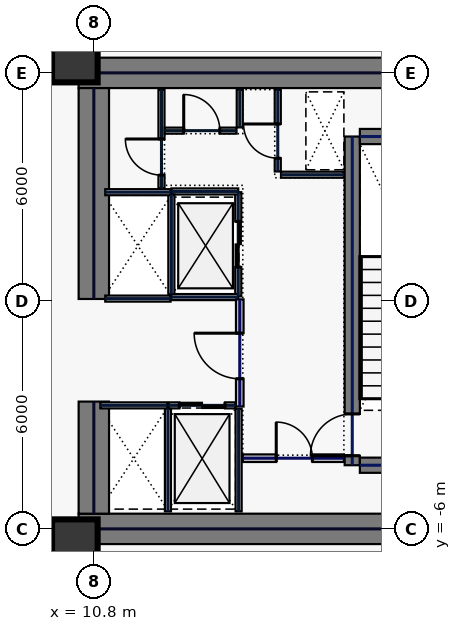
"""IFC4 building model, lengths in metres.
Left out: names, types, materials, properties, quantities, classifications, styles, units other than length and angle.
Written with IfcOpenShell. Run it as: python <this file> out.ifc"""

import sys

from ifc_helpers import new_model, si_unit, direction, frame, frame_2d, origin, origin_2d, place, context, subcontext, project, spatial, rectangle, hollow_rectangle, extrude, element, fill, save


model = new_model("IFC4")
c1 = context("Model", 3, precision=1e-05, world=origin(), true_north=direction((0.0, 1.0)))
c2 = subcontext(c1, "Body", "Model", "MODEL_VIEW")
j1 = project(units=[si_unit("LENGTHUNIT", "METRE"), si_unit("PLANEANGLEUNIT", "RADIAN")], contexts=[c1])
p1 = place(None, origin())
s1 = spatial("IfcSite", under=j1, at=p1, CompositionType="ELEMENT")
p2 = place(p1, origin())
s2 = spatial("IfcBuilding", under=s1, at=p2, CompositionType="ELEMENT")
p3 = place(p2, frame((0.0, 0.0, 47.4)))
s3 = spatial("IfcBuildingStorey", under=s2, at=p3, CompositionType="ELEMENT", Elevation=47.4)
for number, where, z_axis, x_axis in (
    (1, (10.4, 6.0, 0.0), (0.0, 0.0, 1.0), (1.0, 0.0, 0.0)),
    (2, (10.4, -6.0, 0.0), (0.0, 0.0, 1.0), (1.0, 0.0, 0.0)),
):
    element("IfcWall", number, at=place(p3, frame(where, z_axis=z_axis, x_axis=x_axis)), inside=s3, PredefinedType="SHEAR", context=c2, shape_type="SweptSolid", body=[
        extrude(rectangle(XDim=11.6, YDim=0.8, at=frame_2d((5.8, 0.0))), origin(), (0.0, 0.0, 1.0), 3.74),
    ])
p4 = place(p3, frame((10.8, -5.6, 0.0), z_axis=(0.0, 0.0, 1.0), x_axis=(0.0, 1.0, 0.0)))
e3 = element("IfcWall", 3, at=p4, inside=s3, PredefinedType="SHEAR", context=c2, shape_type="SweptSolid", body=[
    extrude(rectangle(XDim=2.95, YDim=0.8, at=frame_2d((1.475, 0.0))), origin(), (0.0, 0.0, 1.0), 3.74),
])
p5 = place(p3, frame((10.8, 0.05, 0.0), z_axis=(0.0, 0.0, 1.0), x_axis=(0.0, 1.0, 0.0)))
e4 = element("IfcWall", 4, at=p5, inside=s3, PredefinedType="SHEAR", context=c2, shape_type="SweptSolid", body=[
    extrude(rectangle(XDim=5.55, YDim=0.8, at=frame_2d((2.775, 0.0))), origin(), (0.0, 0.0, 1.0), 3.74),
])
p6 = place(p3, frame((17.6, -4.325, 0.0), z_axis=(0.0, 0.0, 1.0), x_axis=(0.0, 1.0, 0.0)))
e5 = element("IfcWall", 5, at=p6, inside=s3, PredefinedType="SHEAR", context=c2, shape_type="SweptSolid", body=[
    extrude(rectangle(XDim=8.65, YDim=0.4, at=frame_2d((4.325, 0.0))), origin(), (0.0, 0.0, 1.0), 3.74),
])
p7 = place(p6, frame((0.25, 0.0, 0.0)))
e6 = element("IfcOpeningElement", 6, at=p7, cuts=e5, PredefinedType="OPENING", context=c2, shape_type="SweptSolid", body=[
    extrude(rectangle(XDim=1.1, YDim=2.2, at=frame_2d((0.55, 1.1))), frame((0.0, 0.21, 0.0), z_axis=(0.0, -1.0, 0.0), x_axis=(1.0, 0.0, 0.0)), (0.0, 0.0, 1.0), 0.42),
])
for number, where, z_axis, x_axis in (
    (7, (17.8, -4.325, 0.0), (0.0, 0.0, 1.0), (1.0, 0.0, 0.0)),
    (8, (17.8, 4.325, 0.0), (0.0, 0.0, 1.0), (1.0, 0.0, 0.0)),
):
    element("IfcWall", number, at=place(p3, frame(where, z_axis=z_axis, x_axis=x_axis)), inside=s3, PredefinedType="SHEAR", context=c2, shape_type="SweptSolid", body=[
        extrude(rectangle(XDim=3.4, YDim=0.4, at=frame_2d((1.7, 0.0))), origin(), (0.0, 0.0, 1.0), 3.74),
    ])
for number, where, z_axis, x_axis in (
    (9, (10.3, -6.35, 0.0), (0.0, 0.0, 1.0), (1.0, 0.0, 0.0)),
    (10, (10.3, 6.35, 0.0), (0.0, 0.0, 1.0), (1.0, 0.0, 0.0)),
):
    element("IfcColumn", number, at=place(p3, frame(where, z_axis=z_axis, x_axis=x_axis)), inside=s3, PredefinedType="COLUMN", context=c2, shape_type="SweptSolid", body=[
        extrude(hollow_rectangle(XDim=1.2, YDim=1.2, WallThickness=0.05, at=origin_2d()), origin(), (0.0, 0.0, 1.0), 3.74),
    ])
p8 = place(p3, frame((14.6, 0.12, 0.0), z_axis=(0.0, 0.0, 1.0), x_axis=(0.0, 1.0, 0.0)))
e11 = element("IfcWall", 11, at=p8, inside=s3, PredefinedType="PARTITIONING", context=c2, shape_type="SweptSolid", body=[
    extrude(rectangle(XDim=2.74, YDim=0.16, at=frame_2d((1.37, 0.0))), origin(), (0.0, 0.0, 1.0), 3.74),
])
p9 = place(p8, frame((0.77, 0.0, 0.0)))
e12 = element("IfcOpeningElement", 12, at=p9, cuts=e11, PredefinedType="OPENING", context=c2, shape_type="SweptSolid", body=[
    extrude(rectangle(XDim=1.2, YDim=2.2, at=frame_2d((0.6, 1.1))), frame((0.0, 0.09, 0.0), z_axis=(0.0, -1.0, 0.0), x_axis=(1.0, 0.0, 0.0)), (0.0, 0.0, 1.0), 0.18),
])
for number, where, z_axis, x_axis in (
    (13, (12.84, 0.1, 0.0), (0.0, 0.0, 1.0), (1.0, 0.0, 0.0)),
    (14, (12.84, 2.88, 0.0), (0.0, 0.0, 1.0), (1.0, 0.0, 0.0)),
):
    element("IfcWall", number, at=place(p3, frame(where, z_axis=z_axis, x_axis=x_axis)), inside=s3, PredefinedType="PARTITIONING", context=c2, shape_type="SweptSolid", body=[
        extrude(rectangle(XDim=1.76, YDim=0.16, at=frame_2d((0.88, 0.0))), origin(), (0.0, 0.0, 1.0), 3.74),
    ])
p10 = place(p3, frame((12.84, 0.18, 0.0), z_axis=(0.0, 0.0, 1.0), x_axis=(0.0, 1.0, 0.0)))
e15 = element("IfcWall", 15, at=p10, inside=s3, PredefinedType="PARTITIONING", context=c2, shape_type="SweptSolid", body=[
    extrude(rectangle(XDim=2.62, YDim=0.16, at=frame_2d((1.31, 0.0))), origin(), (0.0, 0.0, 1.0), 3.74),
])
p11 = place(p3, frame((12.77, -2.75, 0.0), z_axis=(0.0, 0.0, 1.0), x_axis=(1.0, 0.0, 0.0)))
e16 = element("IfcWall", 16, at=p11, inside=s3, PredefinedType="PARTITIONING", context=c2, shape_type="SweptSolid", body=[
    extrude(rectangle(XDim=1.76, YDim=0.16, at=frame_2d((0.88, 0.0))), origin(), (0.0, 0.0, 1.0), 3.74),
])
p12 = place(p11, frame((0.28, 0.0, 0.0)))
e17 = element("IfcOpeningElement", 17, at=p12, cuts=e16, PredefinedType="OPENING", context=c2, shape_type="SweptSolid", body=[
    extrude(rectangle(XDim=1.2, YDim=2.2, at=frame_2d((0.6, 1.1))), frame((0.0, 0.09, 0.0), z_axis=(0.0, -1.0, 0.0), x_axis=(1.0, 0.0, 0.0)), (0.0, 0.0, 1.0), 0.18),
])
for number, where, z_axis, x_axis in (
    (18, (12.75, -5.54, 0.0), (0.0, 0.0, 1.0), (0.0, 1.0, 0.0)),
    (19, (14.61, -5.54, 0.0), (0.0, 0.0, 1.0), (0.0, 1.0, 0.0)),
):
    element("IfcWall", number, at=place(p3, frame(where, z_axis=z_axis, x_axis=x_axis)), inside=s3, PredefinedType="PARTITIONING", context=c2, shape_type="SweptSolid", body=[
        extrude(rectangle(XDim=2.7, YDim=0.16, at=frame_2d((1.35, 0.0))), origin(), (0.0, 0.0, 1.0), 3.74),
    ])
p13 = place(p3, frame((10.97, -2.75, 0.0), z_axis=(0.0, 0.0, 1.0), x_axis=(1.0, 0.0, 0.0)))
e20 = element("IfcWall", 20, at=p13, inside=s3, PredefinedType="PARTITIONING", context=c2, shape_type="SweptSolid", body=[
    extrude(rectangle(XDim=1.76, YDim=0.16, at=frame_2d((0.88, 0.0))), origin(), (0.0, 0.0, 1.0), 3.74),
])
for number, where, z_axis, x_axis in (
    (21, (11.1, 0.06, 0.0), (0.0, 0.0, 1.0), (1.0, 0.0, 0.0)),
    (22, (11.1, 2.86, 0.0), (0.0, 0.0, 1.0), (1.0, 0.0, 0.0)),
):
    element("IfcWall", number, at=place(p3, frame(where, z_axis=z_axis, x_axis=x_axis)), inside=s3, PredefinedType="PARTITIONING", context=c2, shape_type="SweptSolid", body=[
        extrude(rectangle(XDim=1.72, YDim=0.16, at=frame_2d((0.86, 0.0))), origin(), (0.0, 0.0, 1.0), 3.74),
    ])
p14 = place(p3, frame((15.64, 3.405, 0.0), z_axis=(0.0, 0.0, 1.0), x_axis=(0.0, 1.0, 0.0)))
e23 = element("IfcWall", 23, at=p14, inside=s3, PredefinedType="PARTITIONING", context=c2, shape_type="SweptSolid", body=[
    extrude(rectangle(XDim=2.155, YDim=0.16, at=frame_2d((1.078, 0.0))), origin(), (0.0, 0.0, 1.0), 3.74),
])
p15 = place(p14, frame((0.35, 0.0, 0.0)))
e24 = element("IfcOpeningElement", 24, at=p15, cuts=e23, PredefinedType="OPENING", context=c2, shape_type="SweptSolid", body=[
    extrude(rectangle(XDim=0.9, YDim=2.2, at=frame_2d((0.45, 1.1))), frame((0.0, 0.09, 0.0), z_axis=(0.0, -1.0, 0.0), x_axis=(1.0, 0.0, 0.0)), (0.0, 0.0, 1.0), 0.18),
])
p16 = place(p3, frame((15.725, 3.32, 0.0), z_axis=(0.0, 0.0, 1.0), x_axis=(1.0, 0.0, 0.0)))
e25 = element("IfcWall", 25, at=p16, inside=s3, PredefinedType="PARTITIONING", context=c2, shape_type="SweptSolid", body=[
    extrude(rectangle(XDim=1.655, YDim=0.16, at=frame_2d((0.827, 0.0))), origin(), (0.0, 0.0, 1.0), 3.74),
])
p17 = place(p3, frame((14.72, -4.14, 0.0), z_axis=(0.0, 0.0, 1.0), x_axis=(1.0, 0.0, 0.0)))
e26 = element("IfcWall", 26, at=p17, inside=s3, PredefinedType="SOLIDWALL", context=c2, shape_type="SweptSolid", body=[
    extrude(rectangle(XDim=2.66, YDim=0.2, at=frame_2d((1.33, 0.0))), origin(), (0.0, 0.0, 1.0), 3.74),
])
p18 = place(p17, frame((0.88, 0.0, 0.0)))
e27 = element("IfcOpeningElement", 27, at=p18, cuts=e26, PredefinedType="OPENING", context=c2, shape_type="SweptSolid", body=[
    extrude(rectangle(XDim=0.95, YDim=2.2, at=frame_2d((0.475, 1.1))), frame((0.0, 0.11, 0.0), z_axis=(0.0, -1.0, 0.0), x_axis=(1.0, 0.0, 0.0)), (0.0, 0.0, 1.0), 0.22),
])
p19 = place(p3, frame((12.58, 2.96, 0.0), z_axis=(0.0, 0.0, 1.0), x_axis=(0.0, 1.0, 0.0)))
e28 = element("IfcWall", 28, at=p19, inside=s3, PredefinedType="PARTITIONING", context=c2, shape_type="SweptSolid", body=[
    extrude(rectangle(XDim=2.6, YDim=0.16, at=frame_2d((1.3, 0.0))), origin(), (0.0, 0.0, 1.0), 3.74),
])
p20 = place(p19, frame((0.35, 0.0, 0.0)))
e29 = element("IfcOpeningElement", 29, at=p20, cuts=e28, PredefinedType="OPENING", context=c2, shape_type="SweptSolid", body=[
    extrude(rectangle(XDim=0.95, YDim=2.2, at=frame_2d((0.475, 1.1))), frame((0.0, 0.09, 0.0), z_axis=(0.0, -1.0, 0.0), x_axis=(1.0, 0.0, 0.0)), (0.0, 0.0, 1.0), 0.18),
])
p21 = place(p3, frame((12.665, 4.48, 0.0), z_axis=(0.0, 0.0, 1.0), x_axis=(1.0, 0.0, 0.0)))
e30 = element("IfcWall", 30, at=p21, inside=s3, PredefinedType="PARTITIONING", context=c2, shape_type="SweptSolid", body=[
    extrude(rectangle(XDim=1.89, YDim=0.16, at=frame_2d((0.945, 0.0))), origin(), (0.0, 0.0, 1.0), 3.74),
])
p22 = place(p21, frame((0.5, 0.0, 0.0)))
e31 = element("IfcOpeningElement", 31, at=p22, cuts=e30, PredefinedType="OPENING", context=c2, shape_type="SweptSolid", body=[
    extrude(rectangle(XDim=0.95, YDim=2.2, at=frame_2d((0.475, 1.1))), frame((0.0, 0.09, 0.0), z_axis=(0.0, -1.0, 0.0), x_axis=(1.0, 0.0, 0.0)), (0.0, 0.0, 1.0), 0.18),
])
p23 = place(p3, frame((14.64, 4.565, 0.0), z_axis=(0.0, 0.0, 1.0), x_axis=(0.0, 1.0, 0.0)))
e32 = element("IfcWall", 32, at=p23, inside=s3, PredefinedType="PARTITIONING", context=c2, shape_type="SweptSolid", body=[
    extrude(rectangle(XDim=0.995, YDim=0.16, at=frame_2d((0.498, 0.0))), origin(), (0.0, 0.0, 1.0), 3.74),
])
p24 = place(p3, frame((14.64, -2.78, 0.0), z_axis=(0.0, 0.0, 1.0), x_axis=(0.0, 1.0, 0.0)))
e33 = element("IfcWall", 33, at=p24, inside=s3, PredefinedType="SOLIDWALL", context=c2, shape_type="SweptSolid", body=[
    extrude(rectangle(XDim=2.82, YDim=0.2, at=frame_2d((1.41, 0.0))), origin(), (0.0, 0.0, 1.0), 3.74),
])
p25 = place(p24, frame((0.73, 0.0, 0.0)))
e34 = element("IfcOpeningElement", 34, at=p25, cuts=e33, PredefinedType="OPENING", context=c2, shape_type="SweptSolid", body=[
    extrude(rectangle(XDim=1.2, YDim=2.2, at=frame_2d((0.6, 1.1))), frame((0.0, 0.11, 0.0), z_axis=(0.0, -1.0, 0.0), x_axis=(1.0, 0.0, 0.0)), (0.0, 0.0, 1.0), 0.22),
])
p26 = place(p3, frame((10.58, 7.435, 0.0), z_axis=(0.0, 0.0, 1.0), x_axis=(0.0, -1.0, 0.0)))
e35 = element("IfcWall", 35, at=p26, inside=s3, PredefinedType="PARTITIONING", context=c2, shape_type="SweptSolid", body=[
    extrude(rectangle(XDim=1.015, YDim=0.16, at=frame_2d((0.508, 0.0))), origin(), (0.0, 0.0, 1.0), 3.74),
])
p27 = place(p3, frame((10.58, -6.42, 0.0), z_axis=(0.0, 0.0, 1.0), x_axis=(0.0, -1.0, 0.0)))
e36 = element("IfcWall", 36, at=p27, inside=s3, PredefinedType="PARTITIONING", context=c2, shape_type="SweptSolid", body=[
    extrude(rectangle(XDim=0.965, YDim=0.16, at=frame_2d((0.482, 0.0))), origin(), (0.0, 0.0, 1.0), 3.74),
])
p28 = place(p7, origin())
e37 = element("IfcDoor", 37, at=p28, inside=s3, OperationType="SINGLE_SWING_LEFT", PredefinedType="DOOR", context=c2, shape_type="SweptSolid", body=[
    extrude(rectangle(XDim=1.1, YDim=2.2, at=frame_2d((0.55, 1.1))), frame((0.0, 0.025, 0.0), z_axis=(0.0, -1.0, 0.0), x_axis=(1.0, 0.0, 0.0)), (0.0, 0.0, 1.0), 0.05),
])
fill(e6, e37)
p29 = place(p9, origin())
e38 = element("IfcDoor", 38, at=p29, inside=s3, OperationType="SLIDING_TO_LEFT", PredefinedType="DOOR", context=c2, shape_type="SweptSolid", body=[
    extrude(rectangle(XDim=1.2, YDim=2.2, at=frame_2d((0.6, 1.1))), frame((0.0, 0.025, 0.0), z_axis=(0.0, -1.0, 0.0), x_axis=(1.0, 0.0, 0.0)), (0.0, 0.0, 1.0), 0.05),
])
fill(e12, e38)
p30 = place(p12, origin())
e39 = element("IfcDoor", 39, at=p30, inside=s3, OperationType="SLIDING_TO_LEFT", PredefinedType="DOOR", context=c2, shape_type="SweptSolid", body=[
    extrude(rectangle(XDim=1.2, YDim=2.2, at=frame_2d((0.6, 1.1))), frame((0.0, 0.025, 0.0), z_axis=(0.0, -1.0, 0.0), x_axis=(1.0, 0.0, 0.0)), (0.0, 0.0, 1.0), 0.05),
])
fill(e17, e39)
p31 = place(p15, origin())
e40 = element("IfcDoor", 40, at=p31, inside=s3, OperationType="SINGLE_SWING_RIGHT", PredefinedType="DOOR", context=c2, shape_type="SweptSolid", body=[
    extrude(rectangle(XDim=0.9, YDim=2.2, at=frame_2d((0.45, 1.1))), frame((0.0, 0.025, 0.0), z_axis=(0.0, -1.0, 0.0), x_axis=(1.0, 0.0, 0.0)), (0.0, 0.0, 1.0), 0.05),
])
fill(e24, e40)
p32 = place(p18, origin())
e41 = element("IfcDoor", 41, at=p32, inside=s3, OperationType="SINGLE_SWING_LEFT", PredefinedType="DOOR", context=c2, shape_type="SweptSolid", body=[
    extrude(rectangle(XDim=0.95, YDim=2.2, at=frame_2d((0.475, 1.1))), frame((0.0, 0.025, 0.0), z_axis=(0.0, -1.0, 0.0), x_axis=(1.0, 0.0, 0.0)), (0.0, 0.0, 1.0), 0.05),
])
fill(e27, e41)
p33 = place(p20, origin())
e42 = element("IfcDoor", 42, at=p33, inside=s3, OperationType="SINGLE_SWING_RIGHT", PredefinedType="DOOR", context=c2, shape_type="SweptSolid", body=[
    extrude(rectangle(XDim=0.95, YDim=2.2, at=frame_2d((0.475, 1.1))), frame((0.0, 0.025, 0.0), z_axis=(0.0, -1.0, 0.0), x_axis=(1.0, 0.0, 0.0)), (0.0, 0.0, 1.0), 0.05),
])
fill(e29, e42)
p34 = place(p22, origin())
e43 = element("IfcDoor", 43, at=p34, inside=s3, OperationType="SINGLE_SWING_LEFT", PredefinedType="DOOR", context=c2, shape_type="SweptSolid", body=[
    extrude(rectangle(XDim=0.95, YDim=2.2, at=frame_2d((0.475, 1.1))), frame((0.0, 0.025, 0.0), z_axis=(0.0, -1.0, 0.0), x_axis=(1.0, 0.0, 0.0)), (0.0, 0.0, 1.0), 0.05),
])
fill(e31, e43)
p35 = place(p25, origin())
e44 = element("IfcDoor", 44, at=p35, inside=s3, OperationType="SINGLE_SWING_RIGHT", PredefinedType="DOOR", context=c2, shape_type="SweptSolid", body=[
    extrude(rectangle(XDim=1.2, YDim=2.2, at=frame_2d((0.6, 1.1))), frame((0.0, 0.025, 0.0), z_axis=(0.0, -1.0, 0.0), x_axis=(1.0, 0.0, 0.0)), (0.0, 0.0, 1.0), 0.05),
])
fill(e34, e44)
save(model, sys.argv[1])
